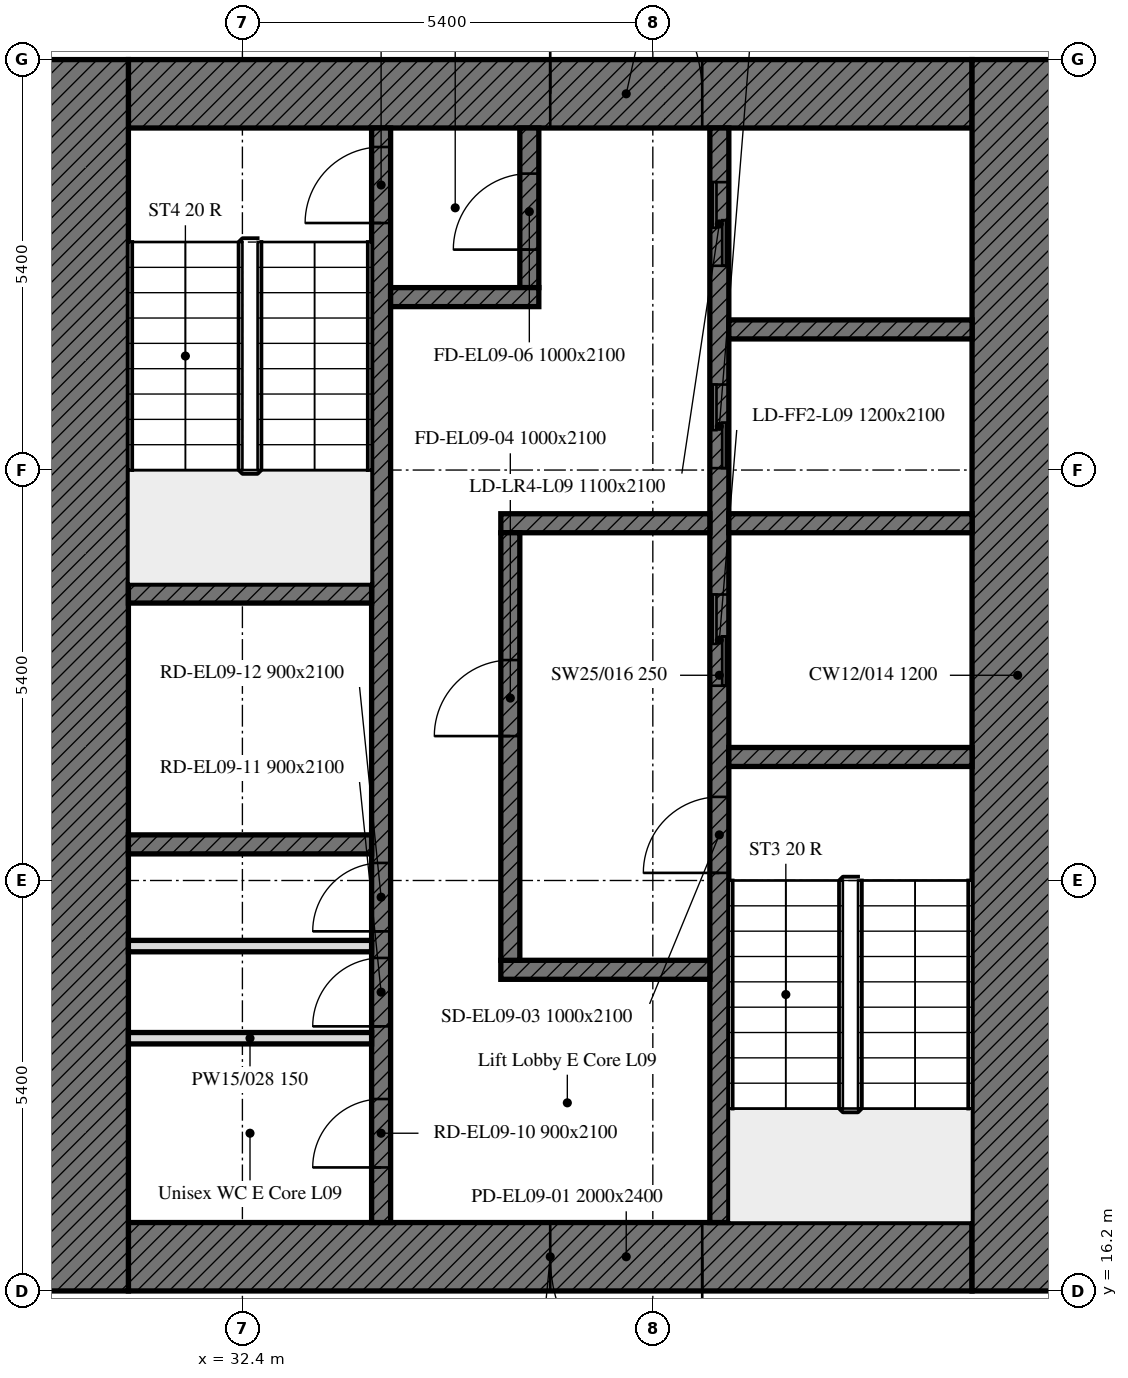
"""IFC4 building model, lengths in metres.
Left out: names, types, materials, properties, quantities, classifications, styles, units other than length and angle.
Written with IfcOpenShell. Run it as: python <this file> out.ifc"""

import sys

from ifc_helpers import new_model, si_unit, direction, frame, frame_2d, origin, place, context, subcontext, project, spatial, rectangle, extrude, element, fill, save


model = new_model("IFC4")
c1 = context("Model", 3, precision=1e-05, world=origin(), true_north=direction((0.0, 1.0)))
c2 = subcontext(c1, "Body", "Model", "MODEL_VIEW")
j1 = project(units=[si_unit("LENGTHUNIT", "METRE"), si_unit("PLANEANGLEUNIT", "RADIAN")], contexts=[c1])
p1 = place(None, origin())
s1 = spatial("IfcSite", under=j1, at=p1, CompositionType="ELEMENT")
p2 = place(p1, origin())
s2 = spatial("IfcBuilding", under=s1, at=p2, CompositionType="ELEMENT")
p3 = place(p2, frame((0.0, 0.0, 45.0)))
s3 = spatial("IfcBuildingStorey", under=s2, at=p3, CompositionType="ELEMENT", Elevation=45.0)
p4 = place(p3, frame((42.0, 16.65, 0.0), z_axis=(0.0, 0.0, 1.0), x_axis=(-1.0, 0.0, 0.0)))
e1 = element("IfcWall", 1, at=p4, inside=s3, PredefinedType="SOLIDWALL", context=c2, shape_type="SweptSolid", body=[
    extrude(rectangle(XDim=11.1, YDim=0.9, at=frame_2d((5.55, 0.0))), origin(), (0.0, 0.0, 1.0), 3.5),
])
p5 = place(p4, frame((3.55, 0.0, 0.0)))
e2 = element("IfcOpeningElement", 2, at=p5, cuts=e1, PredefinedType="OPENING", context=c2, shape_type="SweptSolid", body=[
    extrude(rectangle(XDim=2.0, YDim=2.4, at=frame_2d((1.0, 1.2))), frame((0.0, 0.45, 0.0), z_axis=(0.0, -1.0, 0.0), x_axis=(1.0, 0.0, 0.0)), (0.0, 0.0, 1.0), 0.9),
])
p6 = place(p3, frame((30.9, 31.95, 0.0), z_axis=(0.0, 0.0, 1.0), x_axis=(1.0, 0.0, 0.0)))
e3 = element("IfcWall", 3, at=p6, inside=s3, PredefinedType="SOLIDWALL", context=c2, shape_type="SweptSolid", body=[
    extrude(rectangle(XDim=11.1, YDim=0.9, at=frame_2d((5.55, 0.0))), origin(), (0.0, 0.0, 1.0), 3.5),
])
p7 = place(p6, frame((5.55, 0.0, 0.0)))
e4 = element("IfcOpeningElement", 4, at=p7, cuts=e3, PredefinedType="OPENING", context=c2, shape_type="SweptSolid", body=[
    extrude(rectangle(XDim=2.0, YDim=2.4, at=frame_2d((1.0, 1.2))), frame((0.0, 0.45, 0.0), z_axis=(0.0, -1.0, 0.0), x_axis=(1.0, 0.0, 0.0)), (0.0, 0.0, 1.0), 0.9),
])
for number, where, z_axis, x_axis in (
    (5, (42.6, 32.4, 0.0), (0.0, 0.0, 1.0), (0.0, -1.0, 0.0)),
    (6, (30.3, 16.2, 0.0), (0.0, 0.0, 1.0), (0.0, 1.0, 0.0)),
):
    element("IfcWall", number, at=place(p3, frame(where, z_axis=z_axis, x_axis=x_axis)), inside=s3, PredefinedType="SOLIDWALL", context=c2, shape_type="SweptSolid", body=[
        extrude(rectangle(XDim=16.2, YDim=1.2, at=frame_2d((8.1, 0.0))), origin(), (0.0, 0.0, 1.0), 3.5),
    ])
p8 = place(p3, frame((38.675, 17.1, 0.0), z_axis=(0.0, 0.0, 1.0), x_axis=(0.0, 1.0, 0.0)))
e7 = element("IfcWall", 7, at=p8, inside=s3, PredefinedType="SOLIDWALL", context=c2, shape_type="SweptSolid", body=[
    extrude(rectangle(XDim=14.4, YDim=0.25, at=frame_2d((7.2, 0.0))), origin(), (0.0, 0.0, 1.0), 3.5),
])
p9 = place(p8, frame((4.6, 0.0, 0.0)))
e8 = element("IfcOpeningElement", 8, at=p9, cuts=e7, PredefinedType="OPENING", context=c2, shape_type="SweptSolid", body=[
    extrude(rectangle(XDim=1.0, YDim=2.1, at=frame_2d((0.5, 1.05))), frame((0.0, 0.125, 0.0), z_axis=(0.0, -1.0, 0.0), x_axis=(1.0, 0.0, 0.0)), (0.0, 0.0, 1.0), 0.25),
])
p10 = place(p8, frame((7.062, 0.0, 0.0)))
e9 = element("IfcOpeningElement", 9, at=p10, cuts=e7, PredefinedType="OPENING", context=c2, shape_type="SweptSolid", body=[
    extrude(rectangle(XDim=1.2, YDim=2.1, at=frame_2d((0.6, 1.05))), frame((0.0, 0.125, 0.0), z_axis=(0.0, -1.0, 0.0), x_axis=(1.0, 0.0, 0.0)), (0.0, 0.0, 1.0), 0.25),
])
p11 = place(p8, frame((9.925, 0.0, 0.0)))
e10 = element("IfcOpeningElement", 10, at=p11, cuts=e7, PredefinedType="OPENING", context=c2, shape_type="SweptSolid", body=[
    extrude(rectangle(XDim=1.1, YDim=2.1, at=frame_2d((0.55, 1.05))), frame((0.0, 0.125, 0.0), z_axis=(0.0, -1.0, 0.0), x_axis=(1.0, 0.0, 0.0)), (0.0, 0.0, 1.0), 0.25),
])
p12 = place(p8, frame((12.587, 0.0, 0.0)))
e11 = element("IfcOpeningElement", 11, at=p12, cuts=e7, PredefinedType="OPENING", context=c2, shape_type="SweptSolid", body=[
    extrude(rectangle(XDim=1.1, YDim=2.1, at=frame_2d((0.55, 1.05))), frame((0.0, 0.125, 0.0), z_axis=(0.0, -1.0, 0.0), x_axis=(1.0, 0.0, 0.0)), (0.0, 0.0, 1.0), 0.25),
])
p13 = place(p3, frame((34.225, 17.1, 0.0), z_axis=(0.0, 0.0, 1.0), x_axis=(0.0, 1.0, 0.0)))
e12 = element("IfcWall", 12, at=p13, inside=s3, PredefinedType="SOLIDWALL", context=c2, shape_type="SweptSolid", body=[
    extrude(rectangle(XDim=14.4, YDim=0.25, at=frame_2d((7.2, 0.0))), origin(), (0.0, 0.0, 1.0), 3.5),
])
p14 = place(p13, frame((13.15, 0.0, 0.0)))
e13 = element("IfcOpeningElement", 13, at=p14, cuts=e12, PredefinedType="OPENING", context=c2, shape_type="SweptSolid", body=[
    extrude(rectangle(XDim=1.0, YDim=2.1, at=frame_2d((0.5, 1.05))), frame((0.0, 0.125, 0.0), z_axis=(0.0, -1.0, 0.0), x_axis=(1.0, 0.0, 0.0)), (0.0, 0.0, 1.0), 0.25),
])
p15 = place(p13, frame((0.725, 0.0, 0.0)))
e14 = element("IfcOpeningElement", 14, at=p15, cuts=e12, PredefinedType="OPENING", context=c2, shape_type="SweptSolid", body=[
    extrude(rectangle(XDim=0.9, YDim=2.1, at=frame_2d((0.45, 1.05))), frame((0.0, 0.125, 0.0), z_axis=(0.0, -1.0, 0.0), x_axis=(1.0, 0.0, 0.0)), (0.0, 0.0, 1.0), 0.25),
])
p16 = place(p13, frame((2.581, 0.0, 0.0)))
e15 = element("IfcOpeningElement", 15, at=p16, cuts=e12, PredefinedType="OPENING", context=c2, shape_type="SweptSolid", body=[
    extrude(rectangle(XDim=0.9, YDim=2.1, at=frame_2d((0.45, 1.05))), frame((0.0, 0.125, 0.0), z_axis=(0.0, -1.0, 0.0), x_axis=(1.0, 0.0, 0.0)), (0.0, 0.0, 1.0), 0.25),
])
p17 = place(p13, frame((3.831, 0.0, 0.0)))
e16 = element("IfcOpeningElement", 16, at=p17, cuts=e12, PredefinedType="OPENING", context=c2, shape_type="SweptSolid", body=[
    extrude(rectangle(XDim=0.9, YDim=2.1, at=frame_2d((0.45, 1.05))), frame((0.0, 0.125, 0.0), z_axis=(0.0, -1.0, 0.0), x_axis=(1.0, 0.0, 0.0)), (0.0, 0.0, 1.0), 0.25),
])
p18 = place(p3, frame((38.8, 23.225, 0.0), z_axis=(0.0, 0.0, 1.0), x_axis=(1.0, 0.0, 0.0)))
e17 = element("IfcWall", 17, at=p18, inside=s3, PredefinedType="SOLIDWALL", context=c2, shape_type="SweptSolid", body=[
    extrude(rectangle(XDim=3.2, YDim=0.25, at=frame_2d((1.6, 0.0))), origin(), (0.0, 0.0, 1.0), 3.5),
])
for number, where, z_axis, x_axis in (
    (18, (30.9, 25.375, 0.0), (0.0, 0.0, 1.0), (1.0, 0.0, 0.0)),
    (19, (30.9, 22.075, 0.0), (0.0, 0.0, 1.0), (1.0, 0.0, 0.0)),
):
    element("IfcWall", number, at=place(p3, frame(where, z_axis=z_axis, x_axis=x_axis)), inside=s3, PredefinedType="SOLIDWALL", context=c2, shape_type="SweptSolid", body=[
        extrude(rectangle(XDim=3.2, YDim=0.25, at=frame_2d((1.6, 0.0))), origin(), (0.0, 0.0, 1.0), 3.5),
    ])
p19 = place(p3, frame((38.8, 26.3, 0.0), z_axis=(0.0, 0.0, 1.0), x_axis=(1.0, 0.0, 0.0)))
e20 = element("IfcWall", 20, at=p19, inside=s3, PredefinedType="SOLIDWALL", context=c2, shape_type="SweptSolid", body=[
    extrude(rectangle(XDim=3.2, YDim=0.25, at=frame_2d((1.6, 0.0))), origin(), (0.0, 0.0, 1.0), 3.5),
])
for number, where, z_axis, x_axis in (
    (21, (35.8, 26.3, 0.0), (0.0, 0.0, 1.0), (1.0, 0.0, 0.0)),
    (22, (35.8, 20.425, 0.0), (0.0, 0.0, 1.0), (1.0, 0.0, 0.0)),
):
    element("IfcWall", number, at=place(p3, frame(where, z_axis=z_axis, x_axis=x_axis)), inside=s3, PredefinedType="SOLIDWALL", context=c2, shape_type="SweptSolid", body=[
        extrude(rectangle(XDim=2.75, YDim=0.25, at=frame_2d((1.375, 0.0))), origin(), (0.0, 0.0, 1.0), 3.5),
    ])
p20 = place(p3, frame((36.175, 29.4, 0.0), z_axis=(0.0, 0.0, 1.0), x_axis=(0.0, 1.0, 0.0)))
e23 = element("IfcWall", 23, at=p20, inside=s3, PredefinedType="SOLIDWALL", context=c2, shape_type="SweptSolid", body=[
    extrude(rectangle(XDim=2.1, YDim=0.25, at=frame_2d((1.05, 0.0))), origin(), (0.0, 0.0, 1.0), 3.5),
])
p21 = place(p20, frame((0.5, 0.0, 0.0)))
e24 = element("IfcOpeningElement", 24, at=p21, cuts=e23, PredefinedType="OPENING", context=c2, shape_type="SweptSolid", body=[
    extrude(rectangle(XDim=1.0, YDim=2.1, at=frame_2d((0.5, 1.05))), frame((0.0, 0.125, 0.0), z_axis=(0.0, -1.0, 0.0), x_axis=(1.0, 0.0, 0.0)), (0.0, 0.0, 1.0), 0.25),
])
p22 = place(p3, frame((34.35, 29.275, 0.0), z_axis=(0.0, 0.0, 1.0), x_axis=(1.0, 0.0, 0.0)))
e25 = element("IfcWall", 25, at=p22, inside=s3, PredefinedType="SOLIDWALL", context=c2, shape_type="SweptSolid", body=[
    extrude(rectangle(XDim=1.95, YDim=0.25, at=frame_2d((0.975, 0.0))), origin(), (0.0, 0.0, 1.0), 3.5),
])
p23 = place(p3, frame((35.925, 20.55, 0.0), z_axis=(0.0, 0.0, 1.0), x_axis=(0.0, 1.0, 0.0)))
e26 = element("IfcWall", 26, at=p23, inside=s3, PredefinedType="SOLIDWALL", context=c2, shape_type="SweptSolid", body=[
    extrude(rectangle(XDim=5.625, YDim=0.25, at=frame_2d((2.812, 0.0))), origin(), (0.0, 0.0, 1.0), 3.5),
])
p24 = place(p23, frame((2.95, 0.0, 0.0)))
e27 = element("IfcOpeningElement", 27, at=p24, cuts=e26, PredefinedType="OPENING", context=c2, shape_type="SweptSolid", body=[
    extrude(rectangle(XDim=1.0, YDim=2.1, at=frame_2d((0.5, 1.05))), frame((0.0, 0.125, 0.0), z_axis=(0.0, -1.0, 0.0), x_axis=(1.0, 0.0, 0.0)), (0.0, 0.0, 1.0), 0.25),
])
p25 = place(p3, frame((38.8, 28.85, 0.0), z_axis=(0.0, 0.0, 1.0), x_axis=(1.0, 0.0, 0.0)))
e28 = element("IfcWall", 28, at=p25, inside=s3, PredefinedType="SOLIDWALL", context=c2, shape_type="SweptSolid", body=[
    extrude(rectangle(XDim=3.2, YDim=0.25, at=frame_2d((1.6, 0.0))), origin(), (0.0, 0.0, 1.0), 3.5),
])
for number, where, z_axis, x_axis in (
    (29, (30.9, 19.525, 0.0), (0.0, 0.0, 1.0), (1.0, 0.0, 0.0)),
    (30, (30.9, 20.737, 0.0), (0.0, 0.0, 1.0), (1.0, 0.0, 0.0)),
):
    element("IfcWall", number, at=place(p3, frame(where, z_axis=z_axis, x_axis=x_axis)), inside=s3, PredefinedType="PARTITIONING", context=c2, shape_type="SweptSolid", body=[
        extrude(rectangle(XDim=3.2, YDim=0.15, at=frame_2d((1.6, 0.0))), origin(), (0.0, 0.0, 1.0), 3.5),
    ])
p26 = place(p5, origin())
e31 = element("IfcDoor", 31, at=p26, inside=s3, OperationType="DOUBLE_DOOR_SINGLE_SWING", PredefinedType="DOOR", context=c2, shape_type="SweptSolid", body=[
    extrude(rectangle(XDim=2.0, YDim=2.4, at=frame_2d((1.0, 1.2))), frame((0.0, 0.025, 0.0), z_axis=(0.0, -1.0, 0.0), x_axis=(1.0, 0.0, 0.0)), (0.0, 0.0, 1.0), 0.05),
])
fill(e2, e31)
p27 = place(p7, origin())
e32 = element("IfcDoor", 32, at=p27, inside=s3, OperationType="DOUBLE_DOOR_SINGLE_SWING", PredefinedType="DOOR", context=c2, shape_type="SweptSolid", body=[
    extrude(rectangle(XDim=2.0, YDim=2.4, at=frame_2d((1.0, 1.2))), frame((0.0, 0.025, 0.0), z_axis=(0.0, -1.0, 0.0), x_axis=(1.0, 0.0, 0.0)), (0.0, 0.0, 1.0), 0.05),
])
fill(e4, e32)
p28 = place(p9, origin())
e33 = element("IfcDoor", 33, at=p28, inside=s3, OperationType="SINGLE_SWING_LEFT", PredefinedType="DOOR", context=c2, shape_type="SweptSolid", body=[
    extrude(rectangle(XDim=1.0, YDim=2.1, at=frame_2d((0.5, 1.05))), frame((0.0, 0.025, 0.0), z_axis=(0.0, -1.0, 0.0), x_axis=(1.0, 0.0, 0.0)), (0.0, 0.0, 1.0), 0.05),
])
fill(e8, e33)
p29 = place(p24, origin())
e34 = element("IfcDoor", 34, at=p29, inside=s3, OperationType="SINGLE_SWING_LEFT", PredefinedType="DOOR", context=c2, shape_type="SweptSolid", body=[
    extrude(rectangle(XDim=1.0, YDim=2.1, at=frame_2d((0.5, 1.05))), frame((0.0, 0.025, 0.0), z_axis=(0.0, -1.0, 0.0), x_axis=(1.0, 0.0, 0.0)), (0.0, 0.0, 1.0), 0.05),
])
fill(e27, e34)
p30 = place(p14, origin())
e35 = element("IfcDoor", 35, at=p30, inside=s3, OperationType="SINGLE_SWING_LEFT", PredefinedType="DOOR", context=c2, shape_type="SweptSolid", body=[
    extrude(rectangle(XDim=1.0, YDim=2.1, at=frame_2d((0.5, 1.05))), frame((0.0, 0.025, 0.0), z_axis=(0.0, -1.0, 0.0), x_axis=(1.0, 0.0, 0.0)), (0.0, 0.0, 1.0), 0.05),
])
fill(e13, e35)
p31 = place(p21, origin())
e36 = element("IfcDoor", 36, at=p31, inside=s3, OperationType="SINGLE_SWING_LEFT", PredefinedType="DOOR", context=c2, shape_type="SweptSolid", body=[
    extrude(rectangle(XDim=1.0, YDim=2.1, at=frame_2d((0.5, 1.05))), frame((0.0, 0.025, 0.0), z_axis=(0.0, -1.0, 0.0), x_axis=(1.0, 0.0, 0.0)), (0.0, 0.0, 1.0), 0.05),
])
fill(e24, e36)
p32 = place(p10, origin())
e37 = element("IfcDoor", 37, at=p32, inside=s3, OperationType="DOUBLE_DOOR_SLIDING", PredefinedType="DOOR", context=c2, shape_type="SweptSolid", body=[
    extrude(rectangle(XDim=1.2, YDim=2.1, at=frame_2d((0.6, 1.05))), frame((0.0, 0.025, 0.0), z_axis=(0.0, -1.0, 0.0), x_axis=(1.0, 0.0, 0.0)), (0.0, 0.0, 1.0), 0.05),
])
fill(e9, e37)
p33 = place(p11, origin())
e38 = element("IfcDoor", 38, at=p33, inside=s3, OperationType="DOUBLE_DOOR_SLIDING", PredefinedType="DOOR", context=c2, shape_type="SweptSolid", body=[
    extrude(rectangle(XDim=1.1, YDim=2.1, at=frame_2d((0.55, 1.05))), frame((0.0, 0.025, 0.0), z_axis=(0.0, -1.0, 0.0), x_axis=(1.0, 0.0, 0.0)), (0.0, 0.0, 1.0), 0.05),
])
fill(e10, e38)
p34 = place(p12, origin())
e39 = element("IfcDoor", 39, at=p34, inside=s3, OperationType="DOUBLE_DOOR_SLIDING", PredefinedType="DOOR", context=c2, shape_type="SweptSolid", body=[
    extrude(rectangle(XDim=1.1, YDim=2.1, at=frame_2d((0.55, 1.05))), frame((0.0, 0.025, 0.0), z_axis=(0.0, -1.0, 0.0), x_axis=(1.0, 0.0, 0.0)), (0.0, 0.0, 1.0), 0.05),
])
fill(e11, e39)
p35 = place(p15, origin())
e40 = element("IfcDoor", 40, at=p35, inside=s3, OperationType="SINGLE_SWING_LEFT", PredefinedType="DOOR", context=c2, shape_type="SweptSolid", body=[
    extrude(rectangle(XDim=0.9, YDim=2.1, at=frame_2d((0.45, 1.05))), frame((0.0, 0.025, 0.0), z_axis=(0.0, -1.0, 0.0), x_axis=(1.0, 0.0, 0.0)), (0.0, 0.0, 1.0), 0.05),
])
fill(e14, e40)
p36 = place(p16, origin())
e41 = element("IfcDoor", 41, at=p36, inside=s3, OperationType="SINGLE_SWING_LEFT", PredefinedType="DOOR", context=c2, shape_type="SweptSolid", body=[
    extrude(rectangle(XDim=0.9, YDim=2.1, at=frame_2d((0.45, 1.05))), frame((0.0, 0.025, 0.0), z_axis=(0.0, -1.0, 0.0), x_axis=(1.0, 0.0, 0.0)), (0.0, 0.0, 1.0), 0.05),
])
fill(e15, e41)
p37 = place(p17, origin())
e42 = element("IfcDoor", 42, at=p37, inside=s3, OperationType="SINGLE_SWING_LEFT", PredefinedType="DOOR", context=c2, shape_type="SweptSolid", body=[
    extrude(rectangle(XDim=0.9, YDim=2.1, at=frame_2d((0.45, 1.05))), frame((0.0, 0.025, 0.0), z_axis=(0.0, -1.0, 0.0), x_axis=(1.0, 0.0, 0.0)), (0.0, 0.0, 1.0), 0.05),
])
fill(e16, e42)
save(model, sys.argv[1])
